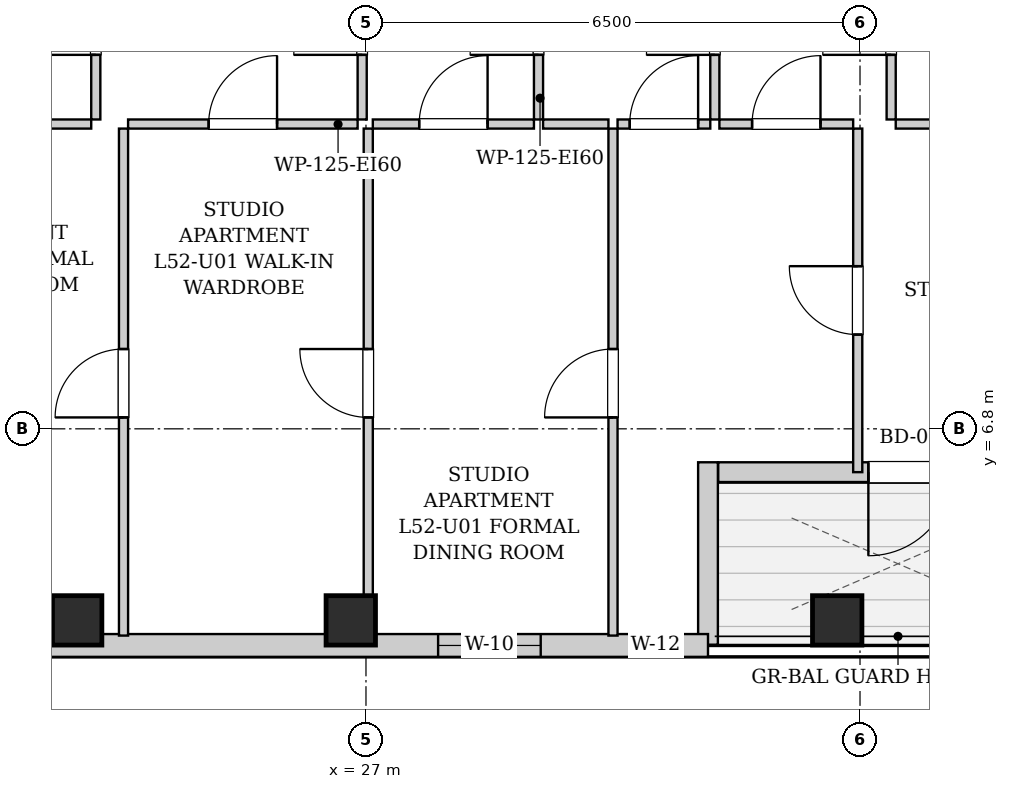
"""IFC4 building model, lengths in metres.
Left out: names, types, materials, properties, quantities, classifications, styles, units other than length and angle.
Written with IfcOpenShell. Run it as: python <this file> out.ifc"""

import sys

from ifc_helpers import new_model, si_unit, direction, frame, frame_2d, origin, origin_2d, place, context, subcontext, project, spatial, rectangle, extrude, element, fill, save


model = new_model("IFC4")
c1 = context("Model", 3, precision=1e-05, world=origin(), true_north=direction((0.0, 1.0)))
c2 = subcontext(c1, "Body", "Model", "MODEL_VIEW")
j1 = project(units=[si_unit("LENGTHUNIT", "METRE"), si_unit("PLANEANGLEUNIT", "RADIAN")], contexts=[c1])
p1 = place(None, origin())
s1 = spatial("IfcSite", under=j1, at=p1, CompositionType="ELEMENT")
p2 = place(p1, origin())
s2 = spatial("IfcBuilding", under=s1, at=p2, CompositionType="ELEMENT")
p3 = place(p2, frame((0.0, 0.0, 181.0)))
s3 = spatial("IfcBuildingStorey", under=s2, at=p3, CompositionType="ELEMENT", Elevation=181.0)
for number, where, z_axis, x_axis in (
    (1, (23.2, 4.28, 0.0), (0.0, 0.0, 1.0), (1.0, 0.0, 0.0)),
    (2, (26.8, 4.28, 0.0), (0.0, 0.0, 1.0), (1.0, 0.0, 0.0)),
    (3, (33.2, 4.28, 0.0), (0.0, 0.0, 1.0), (1.0, 0.0, 0.0)),
):
    element("IfcColumn", number, at=place(p3, frame(where, z_axis=z_axis, x_axis=x_axis)), inside=s3, PredefinedType="COLUMN", context=c2, shape_type="SweptSolid", body=[
        extrude(rectangle(XDim=0.65, YDim=0.65, at=origin_2d()), origin(), (0.0, 0.0, 1.0), 3.3),
    ])
p4 = place(p3, frame((36.366, 6.23, 0.0), z_axis=(0.0, 0.0, 1.0), x_axis=(-1.0, 0.0, 0.0)))
e4 = element("IfcWall", 4, at=p4, inside=s3, PredefinedType="SOLIDWALL", context=c2, shape_type="SweptSolid", body=[
    extrude(rectangle(XDim=4.732, YDim=0.26, at=frame_2d((2.366, 0.0))), origin(), (0.0, 0.0, 1.0), 3.04),
])
p5 = place(p4, frame((1.656, 0.0, 0.0)))
e5 = element("IfcOpeningElement", 5, at=p5, cuts=e4, PredefinedType="OPENING", context=c2, shape_type="SweptSolid", body=[
    extrude(rectangle(XDim=1.1, YDim=2.0, at=frame_2d((0.55, 1.0))), frame((0.0, 0.14, 0.0), z_axis=(0.0, -1.0, 0.0), x_axis=(1.0, 0.0, 0.0)), (0.0, 0.0, 1.0), 0.28),
])
p6 = place(p3, frame((31.5, 6.36, 0.0), z_axis=(0.0, 0.0, 1.0), x_axis=(0.0, -1.0, 0.0)))
e6 = element("IfcWall", 6, at=p6, inside=s3, PredefinedType="SOLIDWALL", context=c2, shape_type="SweptSolid", body=[
    extrude(rectangle(XDim=2.4, YDim=0.26, at=frame_2d((1.2, 0.0))), origin(), (0.0, 0.0, 1.0), 3.04),
])
p7 = place(p3, frame((31.5, 3.95, 0.0), z_axis=(0.0, 0.0, 1.0), x_axis=(-1.0, 0.0, 0.0)))
e7 = element("IfcWall", 7, at=p7, inside=s3, PredefinedType="SOLIDWALL", context=c2, shape_type="SweptSolid", body=[
    extrude(rectangle(XDim=11.2, YDim=0.3, at=frame_2d((5.6, 0.0))), origin(), (0.0, 0.0, 1.0), 3.04),
])
p8 = place(p7, frame((9.0, 0.0, 0.55)))
e8 = element("IfcOpeningElement", 8, at=p8, cuts=e7, PredefinedType="OPENING", context=c2, shape_type="SweptSolid", body=[
    extrude(rectangle(XDim=1.35, YDim=1.2, at=frame_2d((0.675, 0.6))), frame((0.0, 0.16, 0.0), z_axis=(0.0, -1.0, 0.0), x_axis=(1.0, 0.0, 0.0)), (0.0, 0.0, 1.0), 0.32),
])
p9 = place(p7, frame((2.201, 0.0, 0.55)))
e9 = element("IfcOpeningElement", 9, at=p9, cuts=e7, PredefinedType="OPENING", context=c2, shape_type="SweptSolid", body=[
    extrude(rectangle(XDim=1.35, YDim=1.2, at=frame_2d((0.675, 0.6))), frame((0.0, 0.16, 0.0), z_axis=(0.0, -1.0, 0.0), x_axis=(1.0, 0.0, 0.0)), (0.0, 0.0, 1.0), 0.32),
])
p10 = place(p7, frame((0.35, 0.0, 0.55)))
e10 = element("IfcOpeningElement", 10, at=p10, cuts=e7, PredefinedType="OPENING", context=c2, shape_type="SweptSolid", body=[
    extrude(rectangle(XDim=0.68, YDim=1.2, at=frame_2d((0.34, 0.6))), frame((0.0, 0.16, 0.0), z_axis=(0.0, -1.0, 0.0), x_axis=(1.0, 0.0, 0.0)), (0.0, 0.0, 1.0), 0.32),
])
p11 = place(p3, frame((23.445, 10.87, 0.0), z_axis=(0.0, 0.0, 1.0), x_axis=(0.0, 1.0, 0.0)))
e11 = element("IfcWall", 11, at=p11, inside=s3, PredefinedType="PARTITIONING", context=c2, shape_type="SweptSolid", body=[
    extrude(rectangle(XDim=2.6, YDim=0.12, at=frame_2d((1.3, 0.0))), origin(), (0.0, 0.0, 1.0), 3.04),
])
p12 = place(p11, frame((0.85, 0.0, 0.0)))
e12 = element("IfcOpeningElement", 12, at=p12, cuts=e11, PredefinedType="OPENING", context=c2, shape_type="SweptSolid", body=[
    extrude(rectangle(XDim=0.9, YDim=2.05, at=frame_2d((0.45, 1.025))), frame((0.0, 0.07, 0.0), z_axis=(0.0, -1.0, 0.0), x_axis=(1.0, 0.0, 0.0)), (0.0, 0.0, 1.0), 0.14),
])
p13 = place(p3, frame((20.65, 10.81, 0.0), z_axis=(0.0, 0.0, 1.0), x_axis=(1.0, 0.0, 0.0)))
e13 = element("IfcWall", 13, at=p13, inside=s3, PredefinedType="PARTITIONING", context=c2, shape_type="SweptSolid", body=[
    extrude(rectangle(XDim=2.735, YDim=0.12, at=frame_2d((1.368, 0.0))), origin(), (0.0, 0.0, 1.0), 3.04),
])
p14 = place(p13, frame((0.918, 0.0, 0.0)))
e14 = element("IfcOpeningElement", 14, at=p14, cuts=e13, PredefinedType="OPENING", context=c2, shape_type="SweptSolid", body=[
    extrude(rectangle(XDim=0.9, YDim=2.05, at=frame_2d((0.45, 1.025))), frame((0.0, 0.07, 0.0), z_axis=(0.0, -1.0, 0.0), x_axis=(1.0, 0.0, 0.0)), (0.0, 0.0, 1.0), 0.14),
])
p15 = place(p3, frame((26.95, 10.87, 0.0), z_axis=(0.0, 0.0, 1.0), x_axis=(0.0, 1.0, 0.0)))
e15 = element("IfcWall", 15, at=p15, inside=s3, PredefinedType="PARTITIONING", context=c2, shape_type="SweptSolid", body=[
    extrude(rectangle(XDim=2.6, YDim=0.12, at=frame_2d((1.3, 0.0))), origin(), (0.0, 0.0, 1.0), 3.04),
])
p16 = place(p15, frame((0.85, 0.0, 0.0)))
e16 = element("IfcOpeningElement", 16, at=p16, cuts=e15, PredefinedType="OPENING", context=c2, shape_type="SweptSolid", body=[
    extrude(rectangle(XDim=0.9, YDim=2.05, at=frame_2d((0.45, 1.025))), frame((0.0, 0.07, 0.0), z_axis=(0.0, -1.0, 0.0), x_axis=(1.0, 0.0, 0.0)), (0.0, 0.0, 1.0), 0.14),
])
p17 = place(p3, frame((23.87, 10.81, 0.0), z_axis=(0.0, 0.0, 1.0), x_axis=(1.0, 0.0, 0.0)))
e17 = element("IfcWall", 17, at=p17, inside=s3, PredefinedType="PARTITIONING", context=c2, shape_type="SweptSolid", body=[
    extrude(rectangle(XDim=3.02, YDim=0.12, at=frame_2d((1.51, 0.0))), origin(), (0.0, 0.0, 1.0), 3.04),
])
p18 = place(p17, frame((1.06, 0.0, 0.0)))
e18 = element("IfcOpeningElement", 18, at=p18, cuts=e17, PredefinedType="OPENING", context=c2, shape_type="SweptSolid", body=[
    extrude(rectangle(XDim=0.9, YDim=2.05, at=frame_2d((0.45, 1.025))), frame((0.0, 0.07, 0.0), z_axis=(0.0, -1.0, 0.0), x_axis=(1.0, 0.0, 0.0)), (0.0, 0.0, 1.0), 0.14),
])
p19 = place(p3, frame((29.27, 10.87, 0.0), z_axis=(0.0, 0.0, 1.0), x_axis=(0.0, 1.0, 0.0)))
e19 = element("IfcWall", 19, at=p19, inside=s3, PredefinedType="PARTITIONING", context=c2, shape_type="SweptSolid", body=[
    extrude(rectangle(XDim=2.6, YDim=0.12, at=frame_2d((1.3, 0.0))), origin(), (0.0, 0.0, 1.0), 3.04),
])
p20 = place(p19, frame((0.85, 0.0, 0.0)))
e20 = element("IfcOpeningElement", 20, at=p20, cuts=e19, PredefinedType="OPENING", context=c2, shape_type="SweptSolid", body=[
    extrude(rectangle(XDim=0.9, YDim=2.05, at=frame_2d((0.45, 1.025))), frame((0.0, 0.07, 0.0), z_axis=(0.0, -1.0, 0.0), x_axis=(1.0, 0.0, 0.0)), (0.0, 0.0, 1.0), 0.14),
])
p21 = place(p3, frame((27.09, 10.81, 0.0), z_axis=(0.0, 0.0, 1.0), x_axis=(1.0, 0.0, 0.0)))
e21 = element("IfcWall", 21, at=p21, inside=s3, PredefinedType="PARTITIONING", context=c2, shape_type="SweptSolid", body=[
    extrude(rectangle(XDim=2.12, YDim=0.12, at=frame_2d((1.06, 0.0))), origin(), (0.0, 0.0, 1.0), 3.04),
])
p22 = place(p21, frame((0.61, 0.0, 0.0)))
e22 = element("IfcOpeningElement", 22, at=p22, cuts=e21, PredefinedType="OPENING", context=c2, shape_type="SweptSolid", body=[
    extrude(rectangle(XDim=0.9, YDim=2.05, at=frame_2d((0.45, 1.025))), frame((0.0, 0.07, 0.0), z_axis=(0.0, -1.0, 0.0), x_axis=(1.0, 0.0, 0.0)), (0.0, 0.0, 1.0), 0.14),
])
p23 = place(p3, frame((31.59, 10.87, 0.0), z_axis=(0.0, 0.0, 1.0), x_axis=(0.0, 1.0, 0.0)))
e23 = element("IfcWall", 23, at=p23, inside=s3, PredefinedType="PARTITIONING", context=c2, shape_type="SweptSolid", body=[
    extrude(rectangle(XDim=2.6, YDim=0.12, at=frame_2d((1.3, 0.0))), origin(), (0.0, 0.0, 1.0), 3.04),
])
p24 = place(p23, frame((0.85, 0.0, 0.0)))
e24 = element("IfcOpeningElement", 24, at=p24, cuts=e23, PredefinedType="OPENING", context=c2, shape_type="SweptSolid", body=[
    extrude(rectangle(XDim=0.9, YDim=2.05, at=frame_2d((0.45, 1.025))), frame((0.0, 0.07, 0.0), z_axis=(0.0, -1.0, 0.0), x_axis=(1.0, 0.0, 0.0)), (0.0, 0.0, 1.0), 0.14),
])
p25 = place(p3, frame((29.33, 10.81, 0.0), z_axis=(0.0, 0.0, 1.0), x_axis=(1.0, 0.0, 0.0)))
e25 = element("IfcWall", 25, at=p25, inside=s3, PredefinedType="PARTITIONING", context=c2, shape_type="SweptSolid", body=[
    extrude(rectangle(XDim=0.86, YDim=0.12, at=frame_2d((0.43, 0.0))), origin(), (0.0, 0.0, 1.0), 3.04),
])
p26 = place(p3, frame((30.31, 10.81, 0.0), z_axis=(0.0, 0.0, 1.0), x_axis=(1.0, 0.0, 0.0)))
e26 = element("IfcWall", 26, at=p26, inside=s3, PredefinedType="PARTITIONING", context=c2, shape_type="SweptSolid", body=[
    extrude(rectangle(XDim=1.22, YDim=0.12, at=frame_2d((0.61, 0.0))), origin(), (0.0, 0.0, 1.0), 3.04),
])
p27 = place(p26, frame((0.16, 0.0, 0.0)))
e27 = element("IfcOpeningElement", 27, at=p27, cuts=e26, PredefinedType="OPENING", context=c2, shape_type="SweptSolid", body=[
    extrude(rectangle(XDim=0.9, YDim=2.05, at=frame_2d((0.45, 1.025))), frame((0.0, 0.07, 0.0), z_axis=(0.0, -1.0, 0.0), x_axis=(1.0, 0.0, 0.0)), (0.0, 0.0, 1.0), 0.14),
])
p28 = place(p3, frame((33.91, 10.87, 0.0), z_axis=(0.0, 0.0, 1.0), x_axis=(0.0, 1.0, 0.0)))
e28 = element("IfcWall", 28, at=p28, inside=s3, PredefinedType="PARTITIONING", context=c2, shape_type="SweptSolid", body=[
    extrude(rectangle(XDim=2.6, YDim=0.12, at=frame_2d((1.3, 0.0))), origin(), (0.0, 0.0, 1.0), 3.04),
])
p29 = place(p28, frame((0.85, 0.0, 0.0)))
e29 = element("IfcOpeningElement", 29, at=p29, cuts=e28, PredefinedType="OPENING", context=c2, shape_type="SweptSolid", body=[
    extrude(rectangle(XDim=0.9, YDim=2.05, at=frame_2d((0.45, 1.025))), frame((0.0, 0.07, 0.0), z_axis=(0.0, -1.0, 0.0), x_axis=(1.0, 0.0, 0.0)), (0.0, 0.0, 1.0), 0.14),
])
p30 = place(p3, frame((31.65, 10.81, 0.0), z_axis=(0.0, 0.0, 1.0), x_axis=(1.0, 0.0, 0.0)))
e30 = element("IfcWall", 30, at=p30, inside=s3, PredefinedType="PARTITIONING", context=c2, shape_type="SweptSolid", body=[
    extrude(rectangle(XDim=1.76, YDim=0.12, at=frame_2d((0.88, 0.0))), origin(), (0.0, 0.0, 1.0), 3.04),
])
p31 = place(p30, frame((0.43, 0.0, 0.0)))
e31 = element("IfcOpeningElement", 31, at=p31, cuts=e30, PredefinedType="OPENING", context=c2, shape_type="SweptSolid", body=[
    extrude(rectangle(XDim=0.9, YDim=2.05, at=frame_2d((0.45, 1.025))), frame((0.0, 0.07, 0.0), z_axis=(0.0, -1.0, 0.0), x_axis=(1.0, 0.0, 0.0)), (0.0, 0.0, 1.0), 0.14),
])
p32 = place(p3, frame((33.97, 10.81, 0.0), z_axis=(0.0, 0.0, 1.0), x_axis=(1.0, 0.0, 0.0)))
e32 = element("IfcWall", 32, at=p32, inside=s3, PredefinedType="PARTITIONING", context=c2, shape_type="SweptSolid", body=[
    extrude(rectangle(XDim=3.75, YDim=0.12, at=frame_2d((1.875, 0.0))), origin(), (0.0, 0.0, 1.0), 3.04),
])
p33 = place(p32, frame((1.425, 0.0, 0.0)))
e33 = element("IfcOpeningElement", 33, at=p33, cuts=e32, PredefinedType="OPENING", context=c2, shape_type="SweptSolid", body=[
    extrude(rectangle(XDim=0.9, YDim=2.05, at=frame_2d((0.45, 1.025))), frame((0.0, 0.07, 0.0), z_axis=(0.0, -1.0, 0.0), x_axis=(1.0, 0.0, 0.0)), (0.0, 0.0, 1.0), 0.14),
])
p34 = place(p3, frame((23.81, 4.08, 0.0), z_axis=(0.0, 0.0, 1.0), x_axis=(0.0, 1.0, 0.0)))
e34 = element("IfcWall", 34, at=p34, inside=s3, PredefinedType="PARTITIONING", context=c2, shape_type="SweptSolid", body=[
    extrude(rectangle(XDim=6.67, YDim=0.12, at=frame_2d((3.335, 0.0))), origin(), (0.0, 0.0, 1.0), 3.04),
])
p35 = place(p34, frame((2.87, 0.0, 0.0)))
e35 = element("IfcOpeningElement", 35, at=p35, cuts=e34, PredefinedType="OPENING", context=c2, shape_type="SweptSolid", body=[
    extrude(rectangle(XDim=0.9, YDim=2.05, at=frame_2d((0.45, 1.025))), frame((0.0, 0.07, 0.0), z_axis=(0.0, -1.0, 0.0), x_axis=(1.0, 0.0, 0.0)), (0.0, 0.0, 1.0), 0.14),
])
p36 = place(p3, frame((27.03, 4.08, 0.0), z_axis=(0.0, 0.0, 1.0), x_axis=(0.0, 1.0, 0.0)))
e36 = element("IfcWall", 36, at=p36, inside=s3, PredefinedType="PARTITIONING", context=c2, shape_type="SweptSolid", body=[
    extrude(rectangle(XDim=6.67, YDim=0.12, at=frame_2d((3.335, 0.0))), origin(), (0.0, 0.0, 1.0), 3.04),
])
p37 = place(p36, frame((2.87, 0.0, 0.0)))
e37 = element("IfcOpeningElement", 37, at=p37, cuts=e36, PredefinedType="OPENING", context=c2, shape_type="SweptSolid", body=[
    extrude(rectangle(XDim=0.9, YDim=2.05, at=frame_2d((0.45, 1.025))), frame((0.0, 0.07, 0.0), z_axis=(0.0, -1.0, 0.0), x_axis=(1.0, 0.0, 0.0)), (0.0, 0.0, 1.0), 0.14),
])
p38 = place(p3, frame((30.25, 4.08, 0.0), z_axis=(0.0, 0.0, 1.0), x_axis=(0.0, 1.0, 0.0)))
e38 = element("IfcWall", 38, at=p38, inside=s3, PredefinedType="PARTITIONING", context=c2, shape_type="SweptSolid", body=[
    extrude(rectangle(XDim=6.67, YDim=0.12, at=frame_2d((3.335, 0.0))), origin(), (0.0, 0.0, 1.0), 3.04),
])
p39 = place(p38, frame((2.87, 0.0, 0.0)))
e39 = element("IfcOpeningElement", 39, at=p39, cuts=e38, PredefinedType="OPENING", context=c2, shape_type="SweptSolid", body=[
    extrude(rectangle(XDim=0.9, YDim=2.05, at=frame_2d((0.45, 1.025))), frame((0.0, 0.07, 0.0), z_axis=(0.0, -1.0, 0.0), x_axis=(1.0, 0.0, 0.0)), (0.0, 0.0, 1.0), 0.14),
])
p40 = place(p3, frame((33.47, 6.23, 0.0), z_axis=(0.0, 0.0, 1.0), x_axis=(0.0, 1.0, 0.0)))
e40 = element("IfcWall", 40, at=p40, inside=s3, PredefinedType="PARTITIONING", context=c2, shape_type="SweptSolid", body=[
    extrude(rectangle(XDim=4.52, YDim=0.12, at=frame_2d((2.26, 0.0))), origin(), (0.0, 0.0, 1.0), 3.04),
])
p41 = place(p40, frame((1.81, 0.0, 0.0)))
e41 = element("IfcOpeningElement", 41, at=p41, cuts=e40, PredefinedType="OPENING", context=c2, shape_type="SweptSolid", body=[
    extrude(rectangle(XDim=0.9, YDim=2.05, at=frame_2d((0.45, 1.025))), frame((0.0, 0.07, 0.0), z_axis=(0.0, -1.0, 0.0), x_axis=(1.0, 0.0, 0.0)), (0.0, 0.0, 1.0), 0.14),
])
p42 = place(p12, origin())
e42 = element("IfcDoor", 42, at=p42, inside=s3, OperationType="SINGLE_SWING_LEFT", PredefinedType="DOOR", context=c2, shape_type="SweptSolid", body=[
    extrude(rectangle(XDim=0.9, YDim=2.05, at=frame_2d((0.45, 1.025))), frame((0.0, 0.025, 0.0), z_axis=(0.0, -1.0, 0.0), x_axis=(1.0, 0.0, 0.0)), (0.0, 0.0, 1.0), 0.05),
])
fill(e12, e42)
p43 = place(p16, origin())
e43 = element("IfcDoor", 43, at=p43, inside=s3, OperationType="SINGLE_SWING_LEFT", PredefinedType="DOOR", context=c2, shape_type="SweptSolid", body=[
    extrude(rectangle(XDim=0.9, YDim=2.05, at=frame_2d((0.45, 1.025))), frame((0.0, 0.025, 0.0), z_axis=(0.0, -1.0, 0.0), x_axis=(1.0, 0.0, 0.0)), (0.0, 0.0, 1.0), 0.05),
])
fill(e16, e43)
p44 = place(p18, origin())
e44 = element("IfcDoor", 44, at=p44, inside=s3, OperationType="SINGLE_SWING_RIGHT", PredefinedType="DOOR", context=c2, shape_type="SweptSolid", body=[
    extrude(rectangle(XDim=0.9, YDim=2.05, at=frame_2d((0.45, 1.025))), frame((0.0, 0.025, 0.0), z_axis=(0.0, -1.0, 0.0), x_axis=(1.0, 0.0, 0.0)), (0.0, 0.0, 1.0), 0.05),
])
fill(e18, e44)
p45 = place(p20, origin())
e45 = element("IfcDoor", 45, at=p45, inside=s3, OperationType="SINGLE_SWING_LEFT", PredefinedType="DOOR", context=c2, shape_type="SweptSolid", body=[
    extrude(rectangle(XDim=0.9, YDim=2.05, at=frame_2d((0.45, 1.025))), frame((0.0, 0.025, 0.0), z_axis=(0.0, -1.0, 0.0), x_axis=(1.0, 0.0, 0.0)), (0.0, 0.0, 1.0), 0.05),
])
fill(e20, e45)
p46 = place(p22, origin())
e46 = element("IfcDoor", 46, at=p46, inside=s3, OperationType="SINGLE_SWING_RIGHT", PredefinedType="DOOR", context=c2, shape_type="SweptSolid", body=[
    extrude(rectangle(XDim=0.9, YDim=2.05, at=frame_2d((0.45, 1.025))), frame((0.0, 0.025, 0.0), z_axis=(0.0, -1.0, 0.0), x_axis=(1.0, 0.0, 0.0)), (0.0, 0.0, 1.0), 0.05),
])
fill(e22, e46)
p47 = place(p24, origin())
e47 = element("IfcDoor", 47, at=p47, inside=s3, OperationType="SINGLE_SWING_LEFT", PredefinedType="DOOR", context=c2, shape_type="SweptSolid", body=[
    extrude(rectangle(XDim=0.9, YDim=2.05, at=frame_2d((0.45, 1.025))), frame((0.0, 0.025, 0.0), z_axis=(0.0, -1.0, 0.0), x_axis=(1.0, 0.0, 0.0)), (0.0, 0.0, 1.0), 0.05),
])
fill(e24, e47)
p48 = place(p27, origin())
e48 = element("IfcDoor", 48, at=p48, inside=s3, OperationType="SINGLE_SWING_RIGHT", PredefinedType="DOOR", context=c2, shape_type="SweptSolid", body=[
    extrude(rectangle(XDim=0.9, YDim=2.05, at=frame_2d((0.45, 1.025))), frame((0.0, 0.025, 0.0), z_axis=(0.0, -1.0, 0.0), x_axis=(1.0, 0.0, 0.0)), (0.0, 0.0, 1.0), 0.05),
])
fill(e27, e48)
p49 = place(p29, origin())
e49 = element("IfcDoor", 49, at=p49, inside=s3, OperationType="SINGLE_SWING_LEFT", PredefinedType="DOOR", context=c2, shape_type="SweptSolid", body=[
    extrude(rectangle(XDim=0.9, YDim=2.05, at=frame_2d((0.45, 1.025))), frame((0.0, 0.025, 0.0), z_axis=(0.0, -1.0, 0.0), x_axis=(1.0, 0.0, 0.0)), (0.0, 0.0, 1.0), 0.05),
])
fill(e29, e49)
p50 = place(p31, origin())
e50 = element("IfcDoor", 50, at=p50, inside=s3, OperationType="SINGLE_SWING_RIGHT", PredefinedType="DOOR", context=c2, shape_type="SweptSolid", body=[
    extrude(rectangle(XDim=0.9, YDim=2.05, at=frame_2d((0.45, 1.025))), frame((0.0, 0.025, 0.0), z_axis=(0.0, -1.0, 0.0), x_axis=(1.0, 0.0, 0.0)), (0.0, 0.0, 1.0), 0.05),
])
fill(e31, e50)
p51 = place(p35, origin())
e51 = element("IfcDoor", 51, at=p51, inside=s3, OperationType="SINGLE_SWING_LEFT", PredefinedType="DOOR", context=c2, shape_type="SweptSolid", body=[
    extrude(rectangle(XDim=0.9, YDim=2.05, at=frame_2d((0.45, 1.025))), frame((0.0, 0.025, 0.0), z_axis=(0.0, -1.0, 0.0), x_axis=(1.0, 0.0, 0.0)), (0.0, 0.0, 1.0), 0.05),
])
fill(e35, e51)
p52 = place(p37, origin())
e52 = element("IfcDoor", 52, at=p52, inside=s3, OperationType="SINGLE_SWING_RIGHT", PredefinedType="DOOR", context=c2, shape_type="SweptSolid", body=[
    extrude(rectangle(XDim=0.9, YDim=2.05, at=frame_2d((0.45, 1.025))), frame((0.0, 0.025, 0.0), z_axis=(0.0, -1.0, 0.0), x_axis=(1.0, 0.0, 0.0)), (0.0, 0.0, 1.0), 0.05),
])
fill(e37, e52)
p53 = place(p39, origin())
e53 = element("IfcDoor", 53, at=p53, inside=s3, OperationType="SINGLE_SWING_LEFT", PredefinedType="DOOR", context=c2, shape_type="SweptSolid", body=[
    extrude(rectangle(XDim=0.9, YDim=2.05, at=frame_2d((0.45, 1.025))), frame((0.0, 0.025, 0.0), z_axis=(0.0, -1.0, 0.0), x_axis=(1.0, 0.0, 0.0)), (0.0, 0.0, 1.0), 0.05),
])
fill(e39, e53)
p54 = place(p41, origin())
e54 = element("IfcDoor", 54, at=p54, inside=s3, OperationType="SINGLE_SWING_RIGHT", PredefinedType="DOOR", context=c2, shape_type="SweptSolid", body=[
    extrude(rectangle(XDim=0.9, YDim=2.05, at=frame_2d((0.45, 1.025))), frame((0.0, 0.025, 0.0), z_axis=(0.0, -1.0, 0.0), x_axis=(1.0, 0.0, 0.0)), (0.0, 0.0, 1.0), 0.05),
])
fill(e41, e54)
p55 = place(p5, origin())
e55 = element("IfcDoor", 55, at=p55, inside=s3, OperationType="SINGLE_SWING_RIGHT", PredefinedType="DOOR", context=c2, shape_type="SweptSolid", body=[
    extrude(rectangle(XDim=1.1, YDim=2.0, at=frame_2d((0.55, 1.0))), frame((0.0, 0.025, 0.0), z_axis=(0.0, -1.0, 0.0), x_axis=(1.0, 0.0, 0.0)), (0.0, 0.0, 1.0), 0.05),
])
fill(e5, e55)
p56 = place(p9, origin())
e56 = element("IfcWindow", 56, at=p56, inside=s3, PartitioningType="SINGLE_PANEL", PredefinedType="WINDOW", context=c2, shape_type="SweptSolid", body=[
    extrude(rectangle(XDim=1.35, YDim=1.2, at=frame_2d((0.675, 0.6))), frame((0.0, 0.03, 0.0), z_axis=(0.0, -1.0, 0.0), x_axis=(1.0, 0.0, 0.0)), (0.0, 0.0, 1.0), 0.06),
])
fill(e9, e56)
p57 = place(p10, origin())
e57 = element("IfcWindow", 57, at=p57, inside=s3, PartitioningType="SINGLE_PANEL", PredefinedType="WINDOW", context=c2, shape_type="SweptSolid", body=[
    extrude(rectangle(XDim=0.68, YDim=1.2, at=frame_2d((0.34, 0.6))), frame((0.0, 0.03, 0.0), z_axis=(0.0, -1.0, 0.0), x_axis=(1.0, 0.0, 0.0)), (0.0, 0.0, 1.0), 0.06),
])
fill(e10, e57)
save(model, sys.argv[1])
